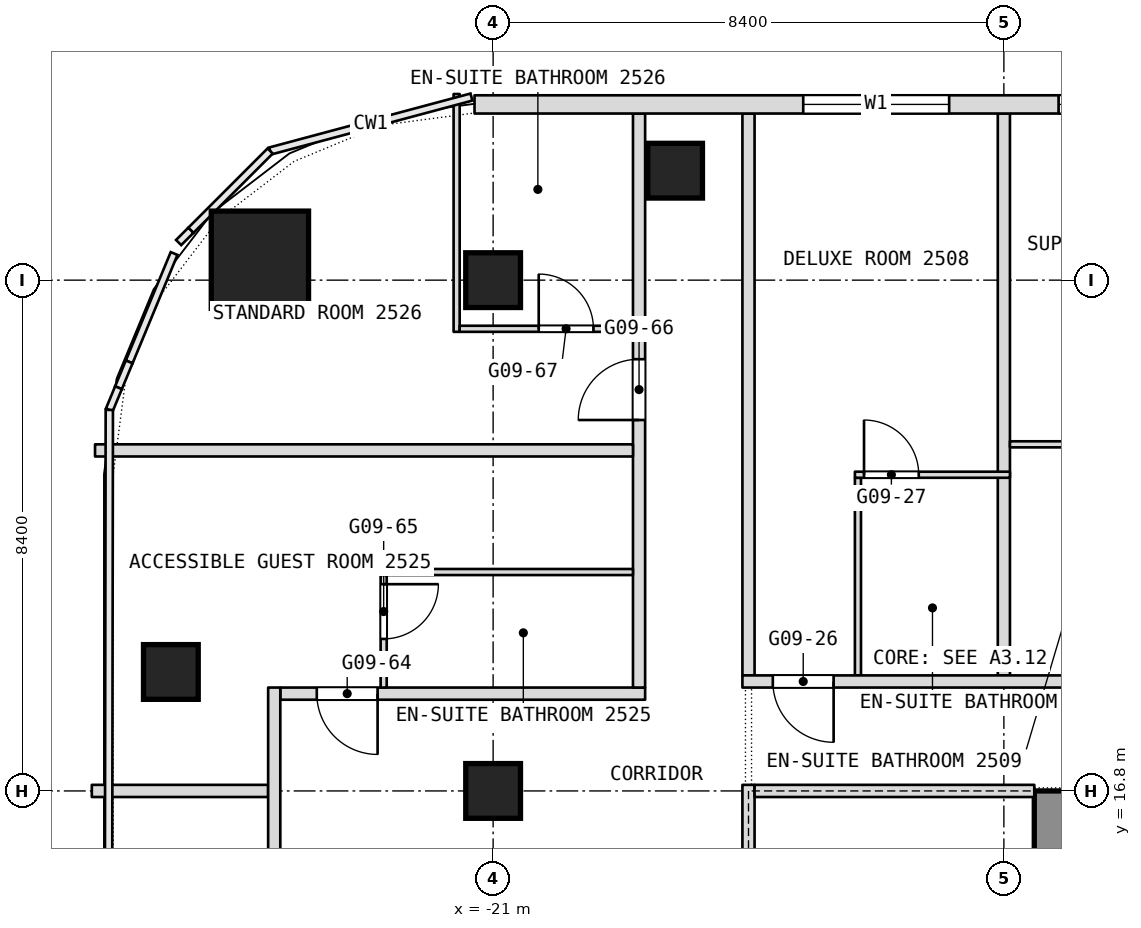
"""IFC4 building model, lengths in metres.
Left out: names, types, materials, properties, quantities, classifications, styles, units other than length and angle.
Written with IfcOpenShell. Run it as: python <this file> out.ifc"""

import sys

from ifc_helpers import new_model, si_unit, direction, frame, frame_2d, origin, origin_2d, place, context, subcontext, project, spatial, rectangle, extrude, element, fill, save


model = new_model("IFC4")
c1 = context("Model", 3, precision=1e-05, world=origin(), true_north=direction((0.0, 1.0)))
c2 = subcontext(c1, "Body", "Model", "MODEL_VIEW")
j1 = project(units=[si_unit("LENGTHUNIT", "METRE"), si_unit("PLANEANGLEUNIT", "RADIAN")], contexts=[c1])
p1 = place(None, origin())
s1 = spatial("IfcSite", under=j1, at=p1, CompositionType="ELEMENT")
p2 = place(p1, origin())
s2 = spatial("IfcBuilding", under=s1, at=p2, CompositionType="ELEMENT")
p3 = place(p2, frame((0.0, 0.0, 115.7)))
s3 = spatial("IfcBuildingStorey", under=s2, at=p3, CompositionType="ELEMENT", Elevation=115.7)
p4 = place(p3, frame((-11.6, 0.0, 0.0), z_axis=(0.0, 0.0, 1.0), x_axis=(0.0, 1.0, 0.0)))
e1 = element("IfcWall", 1, at=p4, inside=s3, PredefinedType="SHEAR", context=c2, shape_type="SweptSolid", body=[
    extrude(rectangle(XDim=16.8, YDim=1.0, at=frame_2d((8.4, 0.0))), origin(), (0.0, 0.0, 1.0), 3.6),
])
p5 = place(p4, frame((1.762, 0.0, 0.0)))
e2 = element("IfcOpeningElement", 2, at=p5, cuts=e1, PredefinedType="OPENING", context=c2, shape_type="SweptSolid", body=[
    extrude(rectangle(XDim=0.9, YDim=2.1, at=frame_2d((0.45, 1.05))), frame((0.0, 0.5, 0.0), z_axis=(0.0, -1.0, 0.0), x_axis=(1.0, 0.0, 0.0)), (0.0, 0.0, 1.0), 1.0),
])
p6 = place(p4, frame((4.387, 0.0, 0.0)))
e3 = element("IfcOpeningElement", 3, at=p6, cuts=e1, PredefinedType="OPENING", context=c2, shape_type="SweptSolid", body=[
    extrude(rectangle(XDim=0.9, YDim=2.1, at=frame_2d((0.45, 1.05))), frame((0.0, 0.5, 0.0), z_axis=(0.0, -1.0, 0.0), x_axis=(1.0, 0.0, 0.0)), (0.0, 0.0, 1.0), 1.0),
])
p7 = place(p4, frame((6.825, 0.0, 0.0)))
e4 = element("IfcOpeningElement", 4, at=p7, cuts=e1, PredefinedType="OPENING", context=c2, shape_type="SweptSolid", body=[
    extrude(rectangle(XDim=1.2, YDim=2.1, at=frame_2d((0.6, 1.05))), frame((0.0, 0.5, 0.0), z_axis=(0.0, -1.0, 0.0), x_axis=(1.0, 0.0, 0.0)), (0.0, 0.0, 1.0), 1.0),
])
p8 = place(p4, frame((12.3, 0.0, 0.0)))
e5 = element("IfcOpeningElement", 5, at=p8, cuts=e1, PredefinedType="OPENING", context=c2, shape_type="SweptSolid", body=[
    extrude(rectangle(XDim=0.9, YDim=2.1, at=frame_2d((0.45, 1.05))), frame((0.0, 0.5, 0.0), z_axis=(0.0, -1.0, 0.0), x_axis=(1.0, 0.0, 0.0)), (0.0, 0.0, 1.0), 1.0),
])
p9 = place(p4, frame((8.775, 0.0, 0.0)))
e6 = element("IfcOpeningElement", 6, at=p9, cuts=e1, PredefinedType="OPENING", context=c2, shape_type="SweptSolid", body=[
    extrude(rectangle(XDim=1.2, YDim=2.1, at=frame_2d((0.6, 1.05))), frame((0.0, 0.5, 0.0), z_axis=(0.0, -1.0, 0.0), x_axis=(1.0, 0.0, 0.0)), (0.0, 0.0, 1.0), 1.0),
])
p10 = place(p3, frame((-24.835, 25.535, 0.0), z_axis=(0.0, 0.0, 1.0), x_axis=(1.0, 0.0, 0.0)))
e7 = element("IfcColumn", 7, at=p10, inside=s3, PredefinedType="COLUMN", context=c2, shape_type="SweptSolid", body=[
    extrude(rectangle(XDim=1.6, YDim=1.6, at=origin_2d()), origin(), (0.0, 0.0, 1.0), 3.6),
])
for number, where, z_axis, x_axis in (
    (8, (-21.0, 16.8, 0.0), (0.0, 0.0, 1.0), (1.0, 0.0, 0.0)),
    (9, (-21.0, 25.2, 0.0), (0.0, 0.0, 1.0), (1.0, 0.0, 0.0)),
    (10, (-26.3, 18.756, 0.0), (0.0, 0.0, 1.0), (1.0, 0.0, 0.0)),
    (11, (-18.007, 27.0, 0.0), (0.0, 0.0, 1.0), (1.0, 0.0, 0.0)),
):
    element("IfcColumn", number, at=place(p3, frame(where, z_axis=z_axis, x_axis=x_axis)), inside=s3, PredefinedType="COLUMN", context=c2, shape_type="SweptSolid", body=[
        extrude(rectangle(XDim=0.9, YDim=0.9, at=origin_2d()), origin(), (0.0, 0.0, 1.0), 3.6),
    ])
p11 = place(p3, frame((-12.6, 18.7, 0.0), z_axis=(0.0, 0.0, 1.0), x_axis=(0.0, 1.0, 0.0)))
e12 = element("IfcWall", 12, at=p11, inside=s3, PredefinedType="PARTITIONING", context=c2, shape_type="SweptSolid", body=[
    extrude(rectangle(XDim=9.24, YDim=0.2, at=frame_2d((4.62, 0.0))), origin(), (0.0, 0.0, 1.0), 3.34),
])
p12 = place(p3, frame((-15.0, 18.7, 0.0), z_axis=(0.0, 0.0, 1.0), x_axis=(0.0, 1.0, 0.0)))
e13 = element("IfcWall", 13, at=p12, inside=s3, PredefinedType="PARTITIONING", context=c2, shape_type="SweptSolid", body=[
    extrude(rectangle(XDim=3.25, YDim=0.1, at=frame_2d((1.625, 0.0))), origin(), (0.0, 0.0, 1.0), 3.34),
])
p13 = place(p3, frame((-16.8, 18.7, 0.0), z_axis=(0.0, 0.0, 1.0), x_axis=(0.0, 1.0, 0.0)))
e14 = element("IfcWall", 14, at=p13, inside=s3, PredefinedType="PARTITIONING", context=c2, shape_type="SweptSolid", body=[
    extrude(rectangle(XDim=9.24, YDim=0.2, at=frame_2d((4.62, 0.0))), origin(), (0.0, 0.0, 1.0), 3.34),
])
p14 = place(p3, frame((-27.6, 16.8, 0.0), z_axis=(0.0, 0.0, 1.0), x_axis=(1.0, 0.0, 0.0)))
e15 = element("IfcWall", 15, at=p14, inside=s3, PredefinedType="PARTITIONING", context=c2, shape_type="SweptSolid", body=[
    extrude(rectangle(XDim=2.9, YDim=0.2, at=frame_2d((1.45, 0.0))), origin(), (0.0, 0.0, 1.0), 2.89),
])
p15 = place(p3, frame((-24.5, 18.4, 0.0), z_axis=(0.0, 0.0, 1.0), x_axis=(1.0, 0.0, 0.0)))
e16 = element("IfcWall", 16, at=p15, inside=s3, PredefinedType="PARTITIONING", context=c2, shape_type="SweptSolid", body=[
    extrude(rectangle(XDim=6.0, YDim=0.2, at=frame_2d((3.0, 0.0))), origin(), (0.0, 0.0, 1.0), 3.34),
])
p16 = place(p15, frame((0.6, 0.0, 0.0)))
e17 = element("IfcOpeningElement", 17, at=p16, cuts=e16, PredefinedType="OPENING", context=c2, shape_type="SweptSolid", body=[
    extrude(rectangle(XDim=1.0, YDim=2.1, at=frame_2d((0.5, 1.05))), frame((0.0, 0.1, 0.0), z_axis=(0.0, -1.0, 0.0), x_axis=(1.0, 0.0, 0.0)), (0.0, 0.0, 1.0), 0.2),
])
p17 = place(p3, frame((-18.6, 18.5, 0.0), z_axis=(0.0, 0.0, 1.0), x_axis=(0.0, 1.0, 0.0)))
e18 = element("IfcWall", 18, at=p17, inside=s3, PredefinedType="PARTITIONING", context=c2, shape_type="SweptSolid", body=[
    extrude(rectangle(XDim=9.44, YDim=0.2, at=frame_2d((4.72, 0.0))), origin(), (0.0, 0.0, 1.0), 3.34),
])
p18 = place(p17, frame((4.4, 0.0, 0.0)))
e19 = element("IfcOpeningElement", 19, at=p18, cuts=e18, PredefinedType="OPENING", context=c2, shape_type="SweptSolid", body=[
    extrude(rectangle(XDim=1.0, YDim=2.1, at=frame_2d((0.5, 1.05))), frame((0.0, 0.1, 0.0), z_axis=(0.0, -1.0, 0.0), x_axis=(1.0, 0.0, 0.0)), (0.0, 0.0, 1.0), 0.2),
])
p19 = place(p3, frame((-16.9, 18.6, 0.0), z_axis=(0.0, 0.0, 1.0), x_axis=(1.0, 0.0, 0.0)))
e20 = element("IfcWall", 20, at=p19, inside=s3, PredefinedType="PARTITIONING", context=c2, shape_type="SweptSolid", body=[
    extrude(rectangle(XDim=18.4, YDim=0.2, at=frame_2d((9.2, 0.0))), origin(), (0.0, 0.0, 1.0), 3.34),
])
p20 = place(p19, frame((0.5, 0.0, 0.0)))
e21 = element("IfcOpeningElement", 21, at=p20, cuts=e20, PredefinedType="OPENING", context=c2, shape_type="SweptSolid", body=[
    extrude(rectangle(XDim=1.0, YDim=2.1, at=frame_2d((0.5, 1.05))), frame((0.0, 0.1, 0.0), z_axis=(0.0, -1.0, 0.0), x_axis=(1.0, 0.0, 0.0)), (0.0, 0.0, 1.0), 0.2),
])
p21 = place(p19, frame((7.1, 0.0, 0.0)))
e22 = element("IfcOpeningElement", 22, at=p21, cuts=e20, PredefinedType="OPENING", context=c2, shape_type="SweptSolid", body=[
    extrude(rectangle(XDim=1.0, YDim=2.1, at=frame_2d((0.5, 1.05))), frame((0.0, 0.1, 0.0), z_axis=(0.0, -1.0, 0.0), x_axis=(1.0, 0.0, 0.0)), (0.0, 0.0, 1.0), 0.2),
])
p22 = place(p19, frame((8.9, 0.0, 0.0)))
e23 = element("IfcOpeningElement", 23, at=p22, cuts=e20, PredefinedType="OPENING", context=c2, shape_type="SweptSolid", body=[
    extrude(rectangle(XDim=1.0, YDim=2.1, at=frame_2d((0.5, 1.05))), frame((0.0, 0.1, 0.0), z_axis=(0.0, -1.0, 0.0), x_axis=(1.0, 0.0, 0.0)), (0.0, 0.0, 1.0), 0.2),
])
p23 = place(p19, frame((13.1, 0.0, 0.0)))
e24 = element("IfcOpeningElement", 24, at=p23, cuts=e20, PredefinedType="OPENING", context=c2, shape_type="SweptSolid", body=[
    extrude(rectangle(XDim=1.0, YDim=2.1, at=frame_2d((0.5, 1.05))), frame((0.0, 0.1, 0.0), z_axis=(0.0, -1.0, 0.0), x_axis=(1.0, 0.0, 0.0)), (0.0, 0.0, 1.0), 0.2),
])
p24 = place(p3, frame((-22.85, 20.4, 0.0), z_axis=(0.0, 0.0, 1.0), x_axis=(1.0, 0.0, 0.0)))
e25 = element("IfcWall", 25, at=p24, inside=s3, PredefinedType="PARTITIONING", context=c2, shape_type="SweptSolid", body=[
    extrude(rectangle(XDim=4.15, YDim=0.1, at=frame_2d((2.075, 0.0))), origin(), (0.0, 0.0, 1.0), 3.34),
])
p25 = place(p3, frame((-21.6, 24.35, 0.0), z_axis=(0.0, 0.0, 1.0), x_axis=(0.0, 1.0, 0.0)))
e26 = element("IfcWall", 26, at=p25, inside=s3, PredefinedType="PARTITIONING", context=c2, shape_type="SweptSolid", body=[
    extrude(rectangle(XDim=3.911, YDim=0.1, at=frame_2d((1.956, 0.0))), origin(), (0.0, 0.0, 1.0), 3.34),
])
p26 = place(p3, frame((-15.05, 22.0, 0.0), z_axis=(0.0, 0.0, 1.0), x_axis=(1.0, 0.0, 0.0)))
e27 = element("IfcWall", 27, at=p26, inside=s3, PredefinedType="PARTITIONING", context=c2, shape_type="SweptSolid", body=[
    extrude(rectangle(XDim=2.55, YDim=0.1, at=frame_2d((1.275, 0.0))), origin(), (0.0, 0.0, 1.0), 3.34),
])
p27 = place(p26, frame((0.15, 0.0, 0.0)))
e28 = element("IfcOpeningElement", 28, at=p27, cuts=e27, PredefinedType="OPENING", context=c2, shape_type="SweptSolid", body=[
    extrude(rectangle(XDim=0.9, YDim=2.1, at=frame_2d((0.45, 1.05))), frame((0.0, 0.05, 0.0), z_axis=(0.0, -1.0, 0.0), x_axis=(1.0, 0.0, 0.0)), (0.0, 0.0, 1.0), 0.1),
])
p28 = place(p3, frame((-27.547, 22.4, 0.0), z_axis=(0.0, 0.0, 1.0), x_axis=(1.0, 0.0, 0.0)))
e29 = element("IfcWall", 29, at=p28, inside=s3, PredefinedType="PARTITIONING", context=c2, shape_type="SweptSolid", body=[
    extrude(rectangle(XDim=8.847, YDim=0.2, at=frame_2d((4.424, 0.0))), origin(), (0.0, 0.0, 1.0), 3.34),
])
p29 = place(p3, frame((-12.5, 22.5, 0.0), z_axis=(0.0, 0.0, 1.0), x_axis=(1.0, 0.0, 0.0)))
e30 = element("IfcWall", 30, at=p29, inside=s3, PredefinedType="PARTITIONING", context=c2, shape_type="SweptSolid", body=[
    extrude(rectangle(XDim=2.25, YDim=0.1, at=frame_2d((1.125, 0.0))), origin(), (0.0, 0.0, 1.0), 3.34),
])
p30 = place(p29, frame((1.2, 0.0, 0.0)))
e31 = element("IfcOpeningElement", 31, at=p30, cuts=e30, PredefinedType="OPENING", context=c2, shape_type="SweptSolid", body=[
    extrude(rectangle(XDim=0.9, YDim=2.1, at=frame_2d((0.45, 1.05))), frame((0.0, 0.05, 0.0), z_axis=(0.0, -1.0, 0.0), x_axis=(1.0, 0.0, 0.0)), (0.0, 0.0, 1.0), 0.1),
])
p31 = place(p3, frame((-22.8, 18.5, 0.0), z_axis=(0.0, 0.0, 1.0), x_axis=(0.0, 1.0, 0.0)))
e32 = element("IfcWall", 32, at=p31, inside=s3, PredefinedType="PARTITIONING", context=c2, shape_type="SweptSolid", body=[
    extrude(rectangle(XDim=1.85, YDim=0.1, at=frame_2d((0.925, 0.0))), origin(), (0.0, 0.0, 1.0), 3.34),
])
p32 = place(p31, frame((0.8, 0.0, 0.0)))
e33 = element("IfcOpeningElement", 33, at=p32, cuts=e32, PredefinedType="OPENING", context=c2, shape_type="SweptSolid", body=[
    extrude(rectangle(XDim=0.9, YDim=2.1, at=frame_2d((0.45, 1.05))), frame((0.0, 0.05, 0.0), z_axis=(0.0, -1.0, 0.0), x_axis=(1.0, 0.0, 0.0)), (0.0, 0.0, 1.0), 0.1),
])
p33 = place(p3, frame((-21.55, 24.4, 0.0), z_axis=(0.0, 0.0, 1.0), x_axis=(1.0, 0.0, 0.0)))
e34 = element("IfcWall", 34, at=p33, inside=s3, PredefinedType="PARTITIONING", context=c2, shape_type="SweptSolid", body=[
    extrude(rectangle(XDim=2.85, YDim=0.1, at=frame_2d((1.425, 0.0))), origin(), (0.0, 0.0, 1.0), 3.34),
])
p34 = place(p33, frame((1.3, 0.0, 0.0)))
e35 = element("IfcOpeningElement", 35, at=p34, cuts=e34, PredefinedType="OPENING", context=c2, shape_type="SweptSolid", body=[
    extrude(rectangle(XDim=0.9, YDim=2.1, at=frame_2d((0.45, 1.05))), frame((0.0, 0.05, 0.0), z_axis=(0.0, -1.0, 0.0), x_axis=(1.0, 0.0, 0.0)), (0.0, 0.0, 1.0), 0.1),
])
p35 = place(p3, frame((-24.6, 6.9, 0.0), z_axis=(0.0, 0.0, 1.0), x_axis=(0.0, 1.0, 0.0)))
e36 = element("IfcWall", 36, at=p35, inside=s3, PredefinedType="PARTITIONING", context=c2, shape_type="SweptSolid", body=[
    extrude(rectangle(XDim=11.6, YDim=0.2, at=frame_2d((5.8, 0.0))), origin(), (0.0, 0.0, 1.0), 3.34),
])
p36 = place(p35, frame((5.45, 0.0, 0.0)))
e37 = element("IfcOpeningElement", 37, at=p36, cuts=e36, PredefinedType="OPENING", context=c2, shape_type="SweptSolid", body=[
    extrude(rectangle(XDim=1.8, YDim=2.1, at=frame_2d((0.9, 1.05))), frame((0.0, 0.1, 0.0), z_axis=(0.0, -1.0, 0.0), x_axis=(1.0, 0.0, 0.0)), (0.0, 0.0, 1.0), 0.2),
])
p37 = place(p35, frame((0.3, 0.0, 0.0)))
e38 = element("IfcOpeningElement", 38, at=p37, cuts=e36, PredefinedType="OPENING", context=c2, shape_type="SweptSolid", body=[
    extrude(rectangle(XDim=1.0, YDim=2.1, at=frame_2d((0.5, 1.05))), frame((0.0, 0.1, 0.0), z_axis=(0.0, -1.0, 0.0), x_axis=(1.0, 0.0, 0.0)), (0.0, 0.0, 1.0), 0.2),
])
p38 = place(p3, frame((21.306, 28.09, 0.0), z_axis=(0.0, 0.0, 1.0), x_axis=(-1.0, 0.0, 0.0)))
e39 = element("IfcWall", 39, at=p38, inside=s3, PredefinedType="NOTDEFINED", context=c2, shape_type="SweptSolid", body=[
    extrude(rectangle(XDim=42.612, YDim=0.3, at=frame_2d((21.306, 0.0))), origin(), (0.0, 0.0, 1.0), 3.6),
])
p39 = place(p38, frame((5.406, 0.0, 0.9)))
e40 = element("IfcOpeningElement", 40, at=p39, cuts=e39, PredefinedType="OPENING", context=c2, shape_type="SweptSolid", body=[
    extrude(rectangle(XDim=2.4, YDim=2.1, at=frame_2d((1.2, 1.05))), frame((0.0, 0.15, 0.0), z_axis=(0.0, -1.0, 0.0), x_axis=(1.0, 0.0, 0.0)), (0.0, 0.0, 1.0), 0.3),
])
p40 = place(p38, frame((9.606, 0.0, 0.9)))
e41 = element("IfcOpeningElement", 41, at=p40, cuts=e39, PredefinedType="OPENING", context=c2, shape_type="SweptSolid", body=[
    extrude(rectangle(XDim=2.4, YDim=2.1, at=frame_2d((1.2, 1.05))), frame((0.0, 0.15, 0.0), z_axis=(0.0, -1.0, 0.0), x_axis=(1.0, 0.0, 0.0)), (0.0, 0.0, 1.0), 0.3),
])
p41 = place(p38, frame((13.806, 0.0, 0.9)))
e42 = element("IfcOpeningElement", 42, at=p41, cuts=e39, PredefinedType="OPENING", context=c2, shape_type="SweptSolid", body=[
    extrude(rectangle(XDim=2.4, YDim=2.1, at=frame_2d((1.2, 1.05))), frame((0.0, 0.15, 0.0), z_axis=(0.0, -1.0, 0.0), x_axis=(1.0, 0.0, 0.0)), (0.0, 0.0, 1.0), 0.3),
])
p42 = place(p38, frame((18.006, 0.0, 0.9)))
e43 = element("IfcOpeningElement", 43, at=p42, cuts=e39, PredefinedType="OPENING", context=c2, shape_type="SweptSolid", body=[
    extrude(rectangle(XDim=2.4, YDim=2.1, at=frame_2d((1.2, 1.05))), frame((0.0, 0.15, 0.0), z_axis=(0.0, -1.0, 0.0), x_axis=(1.0, 0.0, 0.0)), (0.0, 0.0, 1.0), 0.3),
])
p43 = place(p38, frame((22.206, 0.0, 0.9)))
e44 = element("IfcOpeningElement", 44, at=p43, cuts=e39, PredefinedType="OPENING", context=c2, shape_type="SweptSolid", body=[
    extrude(rectangle(XDim=2.4, YDim=2.1, at=frame_2d((1.2, 1.05))), frame((0.0, 0.15, 0.0), z_axis=(0.0, -1.0, 0.0), x_axis=(1.0, 0.0, 0.0)), (0.0, 0.0, 1.0), 0.3),
])
p44 = place(p38, frame((26.406, 0.0, 0.9)))
e45 = element("IfcOpeningElement", 45, at=p44, cuts=e39, PredefinedType="OPENING", context=c2, shape_type="SweptSolid", body=[
    extrude(rectangle(XDim=2.4, YDim=2.1, at=frame_2d((1.2, 1.05))), frame((0.0, 0.15, 0.0), z_axis=(0.0, -1.0, 0.0), x_axis=(1.0, 0.0, 0.0)), (0.0, 0.0, 1.0), 0.3),
])
p45 = place(p38, frame((30.606, 0.0, 0.9)))
e46 = element("IfcOpeningElement", 46, at=p45, cuts=e39, PredefinedType="OPENING", context=c2, shape_type="SweptSolid", body=[
    extrude(rectangle(XDim=2.4, YDim=2.1, at=frame_2d((1.2, 1.05))), frame((0.0, 0.15, 0.0), z_axis=(0.0, -1.0, 0.0), x_axis=(1.0, 0.0, 0.0)), (0.0, 0.0, 1.0), 0.3),
])
p46 = place(p38, frame((34.806, 0.0, 0.9)))
e47 = element("IfcOpeningElement", 47, at=p46, cuts=e39, PredefinedType="OPENING", context=c2, shape_type="SweptSolid", body=[
    extrude(rectangle(XDim=2.4, YDim=2.1, at=frame_2d((1.2, 1.05))), frame((0.0, 0.15, 0.0), z_axis=(0.0, -1.0, 0.0), x_axis=(1.0, 0.0, 0.0)), (0.0, 0.0, 1.0), 0.3),
])
p47 = place(p3, frame((-16.8, -0.1, 0.0), z_axis=(0.0, 0.0, 1.0), x_axis=(0.0, 1.0, 0.0)))
e48 = element("IfcWall", 48, at=p47, inside=s3, PredefinedType="PARTITIONING", context=c2, shape_type="SweptSolid", body=[
    extrude(rectangle(XDim=17.0, YDim=0.2, at=frame_2d((8.5, 0.0))), origin(), (0.0, 0.0, 1.0), 3.34),
])
p48 = place(p47, frame((2.2, 0.0, 0.0)))
e49 = element("IfcOpeningElement", 49, at=p48, cuts=e48, PredefinedType="OPENING", context=c2, shape_type="SweptSolid", body=[
    extrude(rectangle(XDim=1.8, YDim=2.1, at=frame_2d((0.9, 1.05))), frame((0.0, 0.1, 0.0), z_axis=(0.0, -1.0, 0.0), x_axis=(1.0, 0.0, 0.0)), (0.0, 0.0, 1.0), 0.2),
])
p49 = place(p47, frame((7.2, 0.0, 0.0)))
e50 = element("IfcOpeningElement", 50, at=p49, cuts=e48, PredefinedType="OPENING", context=c2, shape_type="SweptSolid", body=[
    extrude(rectangle(XDim=1.8, YDim=2.1, at=frame_2d((0.9, 1.05))), frame((0.0, 0.1, 0.0), z_axis=(0.0, -1.0, 0.0), x_axis=(1.0, 0.0, 0.0)), (0.0, 0.0, 1.0), 0.2),
])
p50 = place(p3, frame((-16.7, 16.8, 0.0), z_axis=(0.0, 0.0, 1.0), x_axis=(1.0, 0.0, 0.0)))
e51 = element("IfcWall", 51, at=p50, inside=s3, PredefinedType="PARTITIONING", context=c2, shape_type="SweptSolid", body=[
    extrude(rectangle(XDim=4.6, YDim=0.2, at=frame_2d((2.3, 0.0))), origin(), (0.0, 0.0, 1.0), 2.89),
])
p51 = place(p16, origin())
e52 = element("IfcDoor", 52, at=p51, inside=s3, OperationType="SINGLE_SWING_RIGHT", PredefinedType="DOOR", context=c2, shape_type="SweptSolid", body=[
    extrude(rectangle(XDim=1.0, YDim=2.1, at=frame_2d((0.5, 1.05))), frame((0.0, 0.025, 0.0), z_axis=(0.0, -1.0, 0.0), x_axis=(1.0, 0.0, 0.0)), (0.0, 0.0, 1.0), 0.05),
])
fill(e17, e52)
p52 = place(p18, origin())
e53 = element("IfcDoor", 53, at=p52, inside=s3, OperationType="SINGLE_SWING_LEFT", PredefinedType="DOOR", context=c2, shape_type="SweptSolid", body=[
    extrude(rectangle(XDim=1.0, YDim=2.1, at=frame_2d((0.5, 1.05))), frame((0.0, 0.025, 0.0), z_axis=(0.0, -1.0, 0.0), x_axis=(1.0, 0.0, 0.0)), (0.0, 0.0, 1.0), 0.05),
])
fill(e19, e53)
p53 = place(p20, origin())
e54 = element("IfcDoor", 54, at=p53, inside=s3, OperationType="SINGLE_SWING_LEFT", PredefinedType="DOOR", context=c2, shape_type="SweptSolid", body=[
    extrude(rectangle(XDim=1.0, YDim=2.1, at=frame_2d((0.5, 1.05))), frame((0.0, 0.025, 0.0), z_axis=(0.0, -1.0, 0.0), x_axis=(1.0, 0.0, 0.0)), (0.0, 0.0, 1.0), 0.05),
])
fill(e21, e54)
p54 = place(p27, origin())
e55 = element("IfcDoor", 55, at=p54, inside=s3, OperationType="SINGLE_SWING_RIGHT", PredefinedType="DOOR", context=c2, shape_type="SweptSolid", body=[
    extrude(rectangle(XDim=0.9, YDim=2.1, at=frame_2d((0.45, 1.05))), frame((0.0, 0.025, 0.0), z_axis=(0.0, -1.0, 0.0), x_axis=(1.0, 0.0, 0.0)), (0.0, 0.0, 1.0), 0.05),
])
fill(e28, e55)
p55 = place(p32, origin())
e56 = element("IfcDoor", 56, at=p55, inside=s3, OperationType="SINGLE_SWING_LEFT", PredefinedType="DOOR", context=c2, shape_type="SweptSolid", body=[
    extrude(rectangle(XDim=0.9, YDim=2.1, at=frame_2d((0.45, 1.05))), frame((0.0, 0.025, 0.0), z_axis=(0.0, -1.0, 0.0), x_axis=(1.0, 0.0, 0.0)), (0.0, 0.0, 1.0), 0.05),
])
fill(e33, e56)
p56 = place(p34, origin())
e57 = element("IfcDoor", 57, at=p56, inside=s3, OperationType="SINGLE_SWING_LEFT", PredefinedType="DOOR", context=c2, shape_type="SweptSolid", body=[
    extrude(rectangle(XDim=0.9, YDim=2.1, at=frame_2d((0.45, 1.05))), frame((0.0, 0.025, 0.0), z_axis=(0.0, -1.0, 0.0), x_axis=(1.0, 0.0, 0.0)), (0.0, 0.0, 1.0), 0.05),
])
fill(e35, e57)
p57 = place(p45, origin())
e58 = element("IfcWindow", 58, at=p57, inside=s3, PartitioningType="SINGLE_PANEL", PredefinedType="WINDOW", context=c2, shape_type="SweptSolid", body=[
    extrude(rectangle(XDim=2.4, YDim=2.1, at=frame_2d((1.2, 1.05))), frame((0.0, 0.03, 0.0), z_axis=(0.0, -1.0, 0.0), x_axis=(1.0, 0.0, 0.0)), (0.0, 0.0, 1.0), 0.06),
])
fill(e46, e58)
p58 = place(p46, origin())
e59 = element("IfcWindow", 59, at=p58, inside=s3, PartitioningType="SINGLE_PANEL", PredefinedType="WINDOW", context=c2, shape_type="SweptSolid", body=[
    extrude(rectangle(XDim=2.4, YDim=2.1, at=frame_2d((1.2, 1.05))), frame((0.0, 0.03, 0.0), z_axis=(0.0, -1.0, 0.0), x_axis=(1.0, 0.0, 0.0)), (0.0, 0.0, 1.0), 0.06),
])
fill(e47, e59)
save(model, sys.argv[1])
